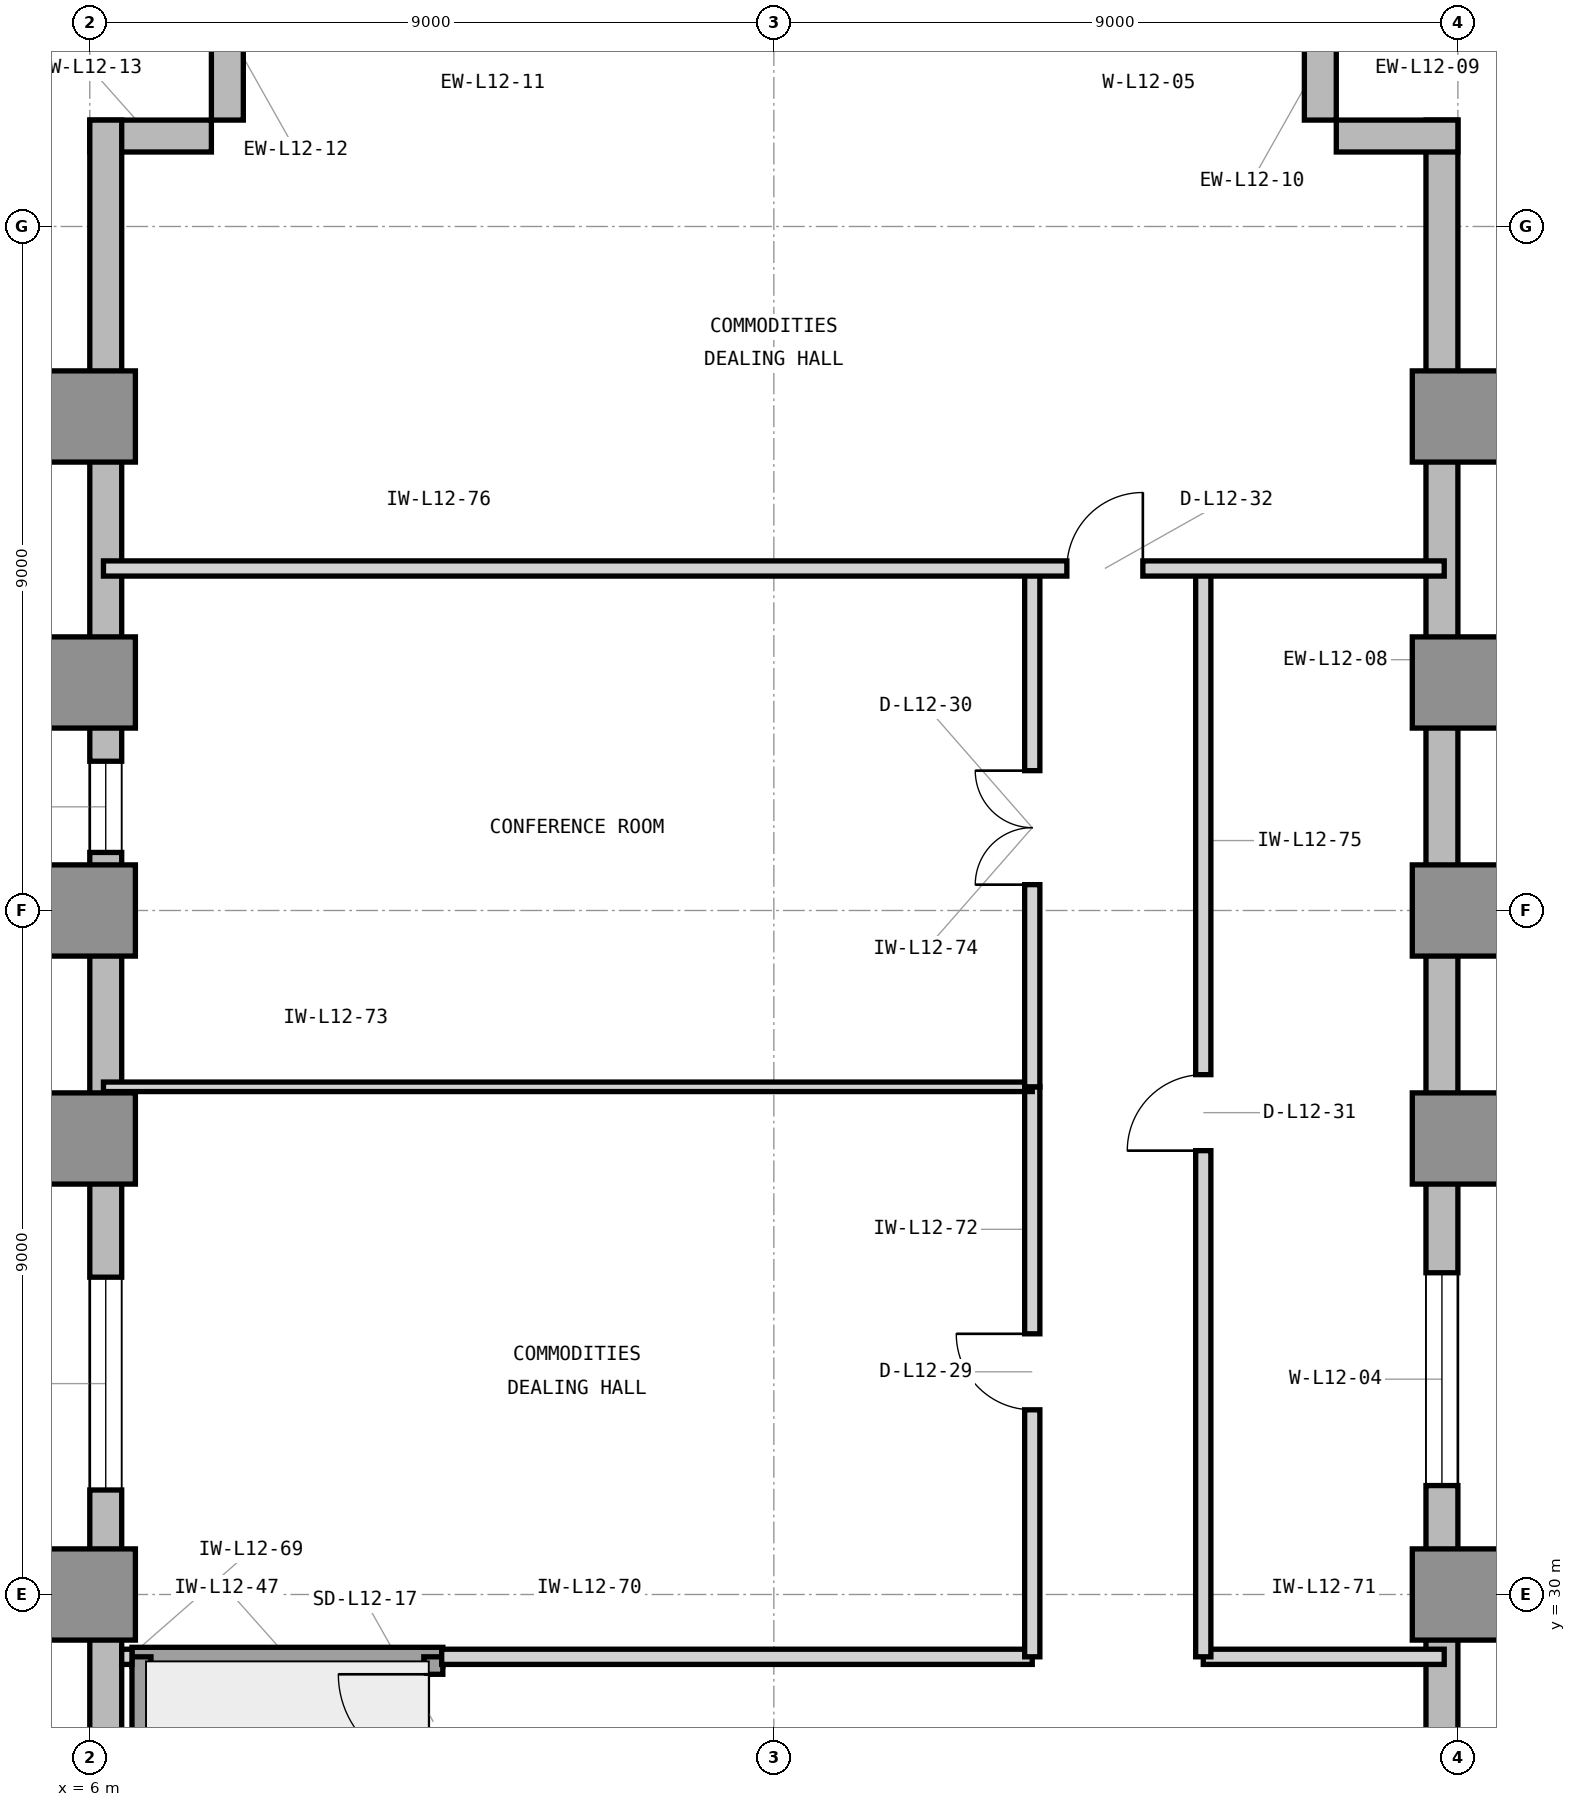
"""IFC4 building model, lengths in metres.
Left out: names, types, materials, properties, quantities, classifications, styles, units other than length and angle.
Written with IfcOpenShell. Run it as: python <this file> out.ifc"""

import sys

from ifc_helpers import new_model, si_unit, direction, frame, frame_2d, origin, origin_2d, place, context, subcontext, project, spatial, rectangle, extrude, element, fill, save


model = new_model("IFC4")
c1 = context("Model", 3, precision=1e-05, world=origin(), true_north=direction((0.0, 1.0)))
c2 = subcontext(c1, "Body", "Model", "MODEL_VIEW")
j1 = project(units=[si_unit("LENGTHUNIT", "METRE"), si_unit("PLANEANGLEUNIT", "RADIAN")], contexts=[c1])
p1 = place(None, origin())
s1 = spatial("IfcSite", under=j1, at=p1, CompositionType="ELEMENT")
p2 = place(p1, origin())
s2 = spatial("IfcBuilding", under=s1, at=p2, CompositionType="ELEMENT")
p3 = place(p2, frame((0.0, 0.0, 55.2)))
s3 = spatial("IfcBuildingStorey", under=s2, at=p3, CompositionType="ELEMENT", Elevation=55.2)
for number, where, z_axis, x_axis in (
    (1, (6.0, 30.0, 0.0), (0.0, 0.0, 1.0), (1.0, 0.0, 0.0)),
    (2, (24.0, 30.0, 0.0), (0.0, 0.0, 1.0), (1.0, 0.0, 0.0)),
    (3, (6.0, 36.0, 0.0), (0.0, 0.0, 1.0), (1.0, 0.0, 0.0)),
    (4, (24.0, 36.0, 0.0), (0.0, 0.0, 1.0), (1.0, 0.0, 0.0)),
    (5, (6.0, 39.0, 0.0), (0.0, 0.0, 1.0), (1.0, 0.0, 0.0)),
    (6, (24.0, 39.0, 0.0), (0.0, 0.0, 1.0), (1.0, 0.0, 0.0)),
    (7, (6.0, 42.0, 0.0), (0.0, 0.0, 1.0), (1.0, 0.0, 0.0)),
    (8, (24.0, 42.0, 0.0), (0.0, 0.0, 1.0), (1.0, 0.0, 0.0)),
    (9, (6.0, 45.5, 0.0), (0.0, 0.0, 1.0), (1.0, 0.0, 0.0)),
    (10, (24.0, 45.5, 0.0), (0.0, 0.0, 1.0), (1.0, 0.0, 0.0)),
):
    element("IfcColumn", number, at=place(p3, frame(where, z_axis=z_axis, x_axis=x_axis)), inside=s3, PredefinedType="COLUMN", context=c2, shape_type="SweptSolid", body=[
        extrude(rectangle(XDim=1.2, YDim=1.2, at=origin_2d()), origin(), (0.0, 0.0, 1.0), 4.2),
    ])
p4 = place(p3, frame((23.79, 21.0, 0.0), z_axis=(0.0, 0.0, 1.0), x_axis=(0.0, 1.0, 0.0)))
e11 = element("IfcWall", 11, at=p4, inside=s3, PredefinedType="STANDARD", context=c2, shape_type="SweptSolid", body=[
    extrude(rectangle(XDim=28.4, YDim=0.42, at=frame_2d((14.2, 0.0))), origin(), (0.0, 0.0, 1.0), 3.98),
])
p5 = place(p4, frame((10.433, 0.0, 0.85)))
e12 = element("IfcOpeningElement", 12, at=p5, cuts=e11, PredefinedType="OPENING", context=c2, shape_type="SweptSolid", body=[
    extrude(rectangle(XDim=2.8, YDim=2.45, at=frame_2d((1.4, 1.225))), frame((0.0, 0.22, 0.0), z_axis=(0.0, -1.0, 0.0), x_axis=(1.0, 0.0, 0.0)), (0.0, 0.0, 1.0), 0.44),
])
for number, where, z_axis, x_axis in (
    (13, (24.0, 49.19, 0.0), (0.0, 0.0, 1.0), (-1.0, 0.0, 0.0)),
    (14, (22.19, 49.4, 0.0), (0.0, 0.0, 1.0), (0.0, 1.0, 0.0)),
    (15, (7.81, 51.0, 0.0), (0.0, 0.0, 1.0), (0.0, -1.0, 0.0)),
    (16, (7.6, 49.19, 0.0), (0.0, 0.0, 1.0), (-1.0, 0.0, 0.0)),
):
    element("IfcWall", number, at=place(p3, frame(where, z_axis=z_axis, x_axis=x_axis)), inside=s3, PredefinedType="STANDARD", context=c2, shape_type="SweptSolid", body=[
        extrude(rectangle(XDim=1.6, YDim=0.42, at=frame_2d((0.8, 0.0))), origin(), (0.0, 0.0, 1.0), 3.98),
    ])
p6 = place(p3, frame((6.21, 49.4, 0.0), z_axis=(0.0, 0.0, 1.0), x_axis=(0.0, -1.0, 0.0)))
e17 = element("IfcWall", 17, at=p6, inside=s3, PredefinedType="STANDARD", context=c2, shape_type="SweptSolid", body=[
    extrude(rectangle(XDim=28.5, YDim=0.42, at=frame_2d((14.25, 0.0))), origin(), (0.0, 0.0, 1.0), 3.98),
])
p7 = place(p6, frame((15.225, 0.0, 0.85)))
e18 = element("IfcOpeningElement", 18, at=p7, cuts=e17, PredefinedType="OPENING", context=c2, shape_type="SweptSolid", body=[
    extrude(rectangle(XDim=2.8, YDim=2.45, at=frame_2d((1.4, 1.225))), frame((0.0, 0.22, 0.0), z_axis=(0.0, -1.0, 0.0), x_axis=(1.0, 0.0, 0.0)), (0.0, 0.0, 1.0), 0.44),
])
p8 = place(p6, frame((8.436, 0.0, 0.85)))
e19 = element("IfcOpeningElement", 19, at=p8, cuts=e17, PredefinedType="OPENING", context=c2, shape_type="SweptSolid", body=[
    extrude(rectangle(XDim=1.2, YDim=2.45, at=frame_2d((0.6, 1.225))), frame((0.0, 0.22, 0.0), z_axis=(0.0, -1.0, 0.0), x_axis=(1.0, 0.0, 0.0)), (0.0, 0.0, 1.0), 0.44),
])
p9 = place(p3, frame((6.555, 29.18, 0.0), z_axis=(0.0, 0.0, 1.0), x_axis=(1.0, 0.0, 0.0)))
e20 = element("IfcWall", 20, at=p9, inside=s3, PredefinedType="SHEAR", context=c2, shape_type="SweptSolid", body=[
    extrude(rectangle(XDim=4.09, YDim=0.25, at=frame_2d((2.045, 0.0))), origin(), (0.0, 0.0, 1.0), 4.2),
])
p10 = place(p3, frame((6.68, 21.68, 0.0), z_axis=(0.0, 0.0, 1.0), x_axis=(0.0, 1.0, 0.0)))
e21 = element("IfcWall", 21, at=p10, inside=s3, PredefinedType="SHEAR", context=c2, shape_type="SweptSolid", body=[
    extrude(rectangle(XDim=7.5, YDim=0.25, at=frame_2d((3.75, 0.0))), origin(), (0.0, 0.0, 1.0), 4.2),
])
p11 = place(p3, frame((10.52, 21.68, 0.0), z_axis=(0.0, 0.0, 1.0), x_axis=(0.0, 1.0, 0.0)))
e22 = element("IfcWall", 22, at=p11, inside=s3, PredefinedType="SHEAR", context=c2, shape_type="SweptSolid", body=[
    extrude(rectangle(XDim=7.5, YDim=0.25, at=frame_2d((3.75, 0.0))), origin(), (0.0, 0.0, 1.0), 4.2),
])
p12 = place(p11, frame((6.02, 0.0, 0.0)))
e23 = element("IfcOpeningElement", 23, at=p12, cuts=e22, PredefinedType="OPENING", context=c2, shape_type="SweptSolid", body=[
    extrude(rectangle(XDim=1.25, YDim=2.2, at=frame_2d((0.625, 1.1))), frame((0.0, 0.135, 0.0), z_axis=(0.0, -1.0, 0.0), x_axis=(1.0, 0.0, 0.0)), (0.0, 0.0, 1.0), 0.27),
])
p13 = place(p3, frame((6.42, 29.18, 0.0), z_axis=(0.0, 0.0, 1.0), x_axis=(1.0, 0.0, 0.0)))
e24 = element("IfcWall", 24, at=p13, inside=s3, PredefinedType="PARTITIONING", context=c2, shape_type="SweptSolid", body=[
    extrude(rectangle(XDim=0.135, YDim=0.2, at=frame_2d((0.067, 0.0))), origin(), (0.0, 0.0, 1.0), 3.97),
])
p14 = place(p3, frame((10.63, 29.18, 0.0), z_axis=(0.0, 0.0, 1.0), x_axis=(1.0, 0.0, 0.0)))
e25 = element("IfcWall", 25, at=p14, inside=s3, PredefinedType="PARTITIONING", context=c2, shape_type="SweptSolid", body=[
    extrude(rectangle(XDim=7.77, YDim=0.2, at=frame_2d((3.885, 0.0))), origin(), (0.0, 0.0, 1.0), 3.97),
])
p15 = place(p3, frame((20.65, 29.18, 0.0), z_axis=(0.0, 0.0, 1.0), x_axis=(1.0, 0.0, 0.0)))
e26 = element("IfcWall", 26, at=p15, inside=s3, PredefinedType="PARTITIONING", context=c2, shape_type="SweptSolid", body=[
    extrude(rectangle(XDim=3.17, YDim=0.2, at=frame_2d((1.585, 0.0))), origin(), (0.0, 0.0, 1.0), 3.97),
])
p16 = place(p3, frame((18.4, 29.18, 0.0), z_axis=(0.0, 0.0, 1.0), x_axis=(0.0, 1.0, 0.0)))
e27 = element("IfcWall", 27, at=p16, inside=s3, PredefinedType="PARTITIONING", context=c2, shape_type="SweptSolid", body=[
    extrude(rectangle(XDim=7.5, YDim=0.2, at=frame_2d((3.75, 0.0))), origin(), (0.0, 0.0, 1.0), 3.97),
])
p17 = place(p16, frame((3.25, 0.0, 0.0)))
e28 = element("IfcOpeningElement", 28, at=p17, cuts=e27, PredefinedType="OPENING", context=c2, shape_type="SweptSolid", body=[
    extrude(rectangle(XDim=1.0, YDim=2.15, at=frame_2d((0.5, 1.075))), frame((0.0, 0.11, 0.0), z_axis=(0.0, -1.0, 0.0), x_axis=(1.0, 0.0, 0.0)), (0.0, 0.0, 1.0), 0.22),
])
p18 = place(p3, frame((6.18, 36.68, 0.0), z_axis=(0.0, 0.0, 1.0), x_axis=(1.0, 0.0, 0.0)))
e29 = element("IfcWall", 29, at=p18, inside=s3, PredefinedType="PARTITIONING", context=c2, shape_type="SweptSolid", body=[
    extrude(rectangle(XDim=12.22, YDim=0.125, at=frame_2d((6.11, 0.0))), origin(), (0.0, 0.0, 1.0), 3.97),
])
p19 = place(p3, frame((18.4, 36.68, 0.0), z_axis=(0.0, 0.0, 1.0), x_axis=(0.0, 1.0, 0.0)))
e30 = element("IfcWall", 30, at=p19, inside=s3, PredefinedType="PARTITIONING", context=c2, shape_type="SweptSolid", body=[
    extrude(rectangle(XDim=6.82, YDim=0.2, at=frame_2d((3.41, 0.0))), origin(), (0.0, 0.0, 1.0), 3.97),
])
p20 = place(p19, frame((2.66, 0.0, 0.0)))
e31 = element("IfcOpeningElement", 31, at=p20, cuts=e30, PredefinedType="OPENING", context=c2, shape_type="SweptSolid", body=[
    extrude(rectangle(XDim=1.5, YDim=2.3, at=frame_2d((0.75, 1.15))), frame((0.0, 0.11, 0.0), z_axis=(0.0, -1.0, 0.0), x_axis=(1.0, 0.0, 0.0)), (0.0, 0.0, 1.0), 0.22),
])
p21 = place(p3, frame((20.65, 29.18, 0.0), z_axis=(0.0, 0.0, 1.0), x_axis=(0.0, 1.0, 0.0)))
e32 = element("IfcWall", 32, at=p21, inside=s3, PredefinedType="PARTITIONING", context=c2, shape_type="SweptSolid", body=[
    extrude(rectangle(XDim=14.32, YDim=0.2, at=frame_2d((7.16, 0.0))), origin(), (0.0, 0.0, 1.0), 3.97),
])
p22 = place(p21, frame((6.66, 0.0, 0.0)))
e33 = element("IfcOpeningElement", 33, at=p22, cuts=e32, PredefinedType="OPENING", context=c2, shape_type="SweptSolid", body=[
    extrude(rectangle(XDim=1.0, YDim=2.15, at=frame_2d((0.5, 1.075))), frame((0.0, 0.11, 0.0), z_axis=(0.0, -1.0, 0.0), x_axis=(1.0, 0.0, 0.0)), (0.0, 0.0, 1.0), 0.22),
])
p23 = place(p3, frame((6.18, 43.5, 0.0), z_axis=(0.0, 0.0, 1.0), x_axis=(1.0, 0.0, 0.0)))
e34 = element("IfcWall", 34, at=p23, inside=s3, PredefinedType="PARTITIONING", context=c2, shape_type="SweptSolid", body=[
    extrude(rectangle(XDim=17.64, YDim=0.2, at=frame_2d((8.82, 0.0))), origin(), (0.0, 0.0, 1.0), 3.97),
])
p24 = place(p23, frame((12.675, 0.0, 0.0)))
e35 = element("IfcOpeningElement", 35, at=p24, cuts=e34, PredefinedType="OPENING", context=c2, shape_type="SweptSolid", body=[
    extrude(rectangle(XDim=1.0, YDim=2.15, at=frame_2d((0.5, 1.075))), frame((0.0, 0.11, 0.0), z_axis=(0.0, -1.0, 0.0), x_axis=(1.0, 0.0, 0.0)), (0.0, 0.0, 1.0), 0.22),
])
p25 = place(p5, origin())
e36 = element("IfcWindow", 36, at=p25, inside=s3, PartitioningType="SINGLE_PANEL", PredefinedType="WINDOW", context=c2, shape_type="SweptSolid", body=[
    extrude(rectangle(XDim=2.8, YDim=2.45, at=frame_2d((1.4, 1.225))), frame((0.0, 0.11, 0.0), z_axis=(0.0, -1.0, 0.0), x_axis=(1.0, 0.0, 0.0)), (0.0, 0.0, 1.0), 0.06),
])
fill(e12, e36)
p26 = place(p7, origin())
e37 = element("IfcWindow", 37, at=p26, inside=s3, PartitioningType="SINGLE_PANEL", PredefinedType="WINDOW", context=c2, shape_type="SweptSolid", body=[
    extrude(rectangle(XDim=2.8, YDim=2.45, at=frame_2d((1.4, 1.225))), frame((0.0, 0.11, 0.0), z_axis=(0.0, -1.0, 0.0), x_axis=(1.0, 0.0, 0.0)), (0.0, 0.0, 1.0), 0.06),
])
fill(e18, e37)
p27 = place(p12, origin())
e38 = element("IfcDoor", 38, at=p27, inside=s3, OperationType="SINGLE_SWING_RIGHT", PredefinedType="DOOR", context=c2, shape_type="SweptSolid", body=[
    extrude(rectangle(XDim=1.25, YDim=2.2, at=frame_2d((0.625, 1.1))), frame((0.0, 0.025, 0.0), z_axis=(0.0, -1.0, 0.0), x_axis=(1.0, 0.0, 0.0)), (0.0, 0.0, 1.0), 0.05),
])
fill(e23, e38)
p28 = place(p17, origin())
e39 = element("IfcDoor", 39, at=p28, inside=s3, OperationType="SINGLE_SWING_RIGHT", PredefinedType="DOOR", context=c2, shape_type="SweptSolid", body=[
    extrude(rectangle(XDim=1.0, YDim=2.15, at=frame_2d((0.5, 1.075))), frame((0.0, 0.025, 0.0), z_axis=(0.0, -1.0, 0.0), x_axis=(1.0, 0.0, 0.0)), (0.0, 0.0, 1.0), 0.05),
])
fill(e28, e39)
p29 = place(p20, origin())
e40 = element("IfcDoor", 40, at=p29, inside=s3, OperationType="DOUBLE_DOOR_SINGLE_SWING", PredefinedType="DOOR", context=c2, shape_type="SweptSolid", body=[
    extrude(rectangle(XDim=1.5, YDim=2.3, at=frame_2d((0.75, 1.15))), frame((0.0, 0.025, 0.0), z_axis=(0.0, -1.0, 0.0), x_axis=(1.0, 0.0, 0.0)), (0.0, 0.0, 1.0), 0.05),
])
fill(e31, e40)
p30 = place(p22, origin())
e41 = element("IfcDoor", 41, at=p30, inside=s3, OperationType="SINGLE_SWING_LEFT", PredefinedType="DOOR", context=c2, shape_type="SweptSolid", body=[
    extrude(rectangle(XDim=1.0, YDim=2.15, at=frame_2d((0.5, 1.075))), frame((0.0, 0.025, 0.0), z_axis=(0.0, -1.0, 0.0), x_axis=(1.0, 0.0, 0.0)), (0.0, 0.0, 1.0), 0.05),
])
fill(e33, e41)
p31 = place(p24, origin())
e42 = element("IfcDoor", 42, at=p31, inside=s3, OperationType="SINGLE_SWING_RIGHT", PredefinedType="DOOR", context=c2, shape_type="SweptSolid", body=[
    extrude(rectangle(XDim=1.0, YDim=2.15, at=frame_2d((0.5, 1.075))), frame((0.0, 0.025, 0.0), z_axis=(0.0, -1.0, 0.0), x_axis=(1.0, 0.0, 0.0)), (0.0, 0.0, 1.0), 0.05),
])
fill(e35, e42)
p32 = place(p8, origin())
e43 = element("IfcWindow", 43, at=p32, inside=s3, PartitioningType="SINGLE_PANEL", PredefinedType="WINDOW", context=c2, shape_type="SweptSolid", body=[
    extrude(rectangle(XDim=1.2, YDim=2.45, at=frame_2d((0.6, 1.225))), frame((0.0, 0.11, 0.0), z_axis=(0.0, -1.0, 0.0), x_axis=(1.0, 0.0, 0.0)), (0.0, 0.0, 1.0), 0.06),
])
fill(e19, e43)
save(model, sys.argv[1])
